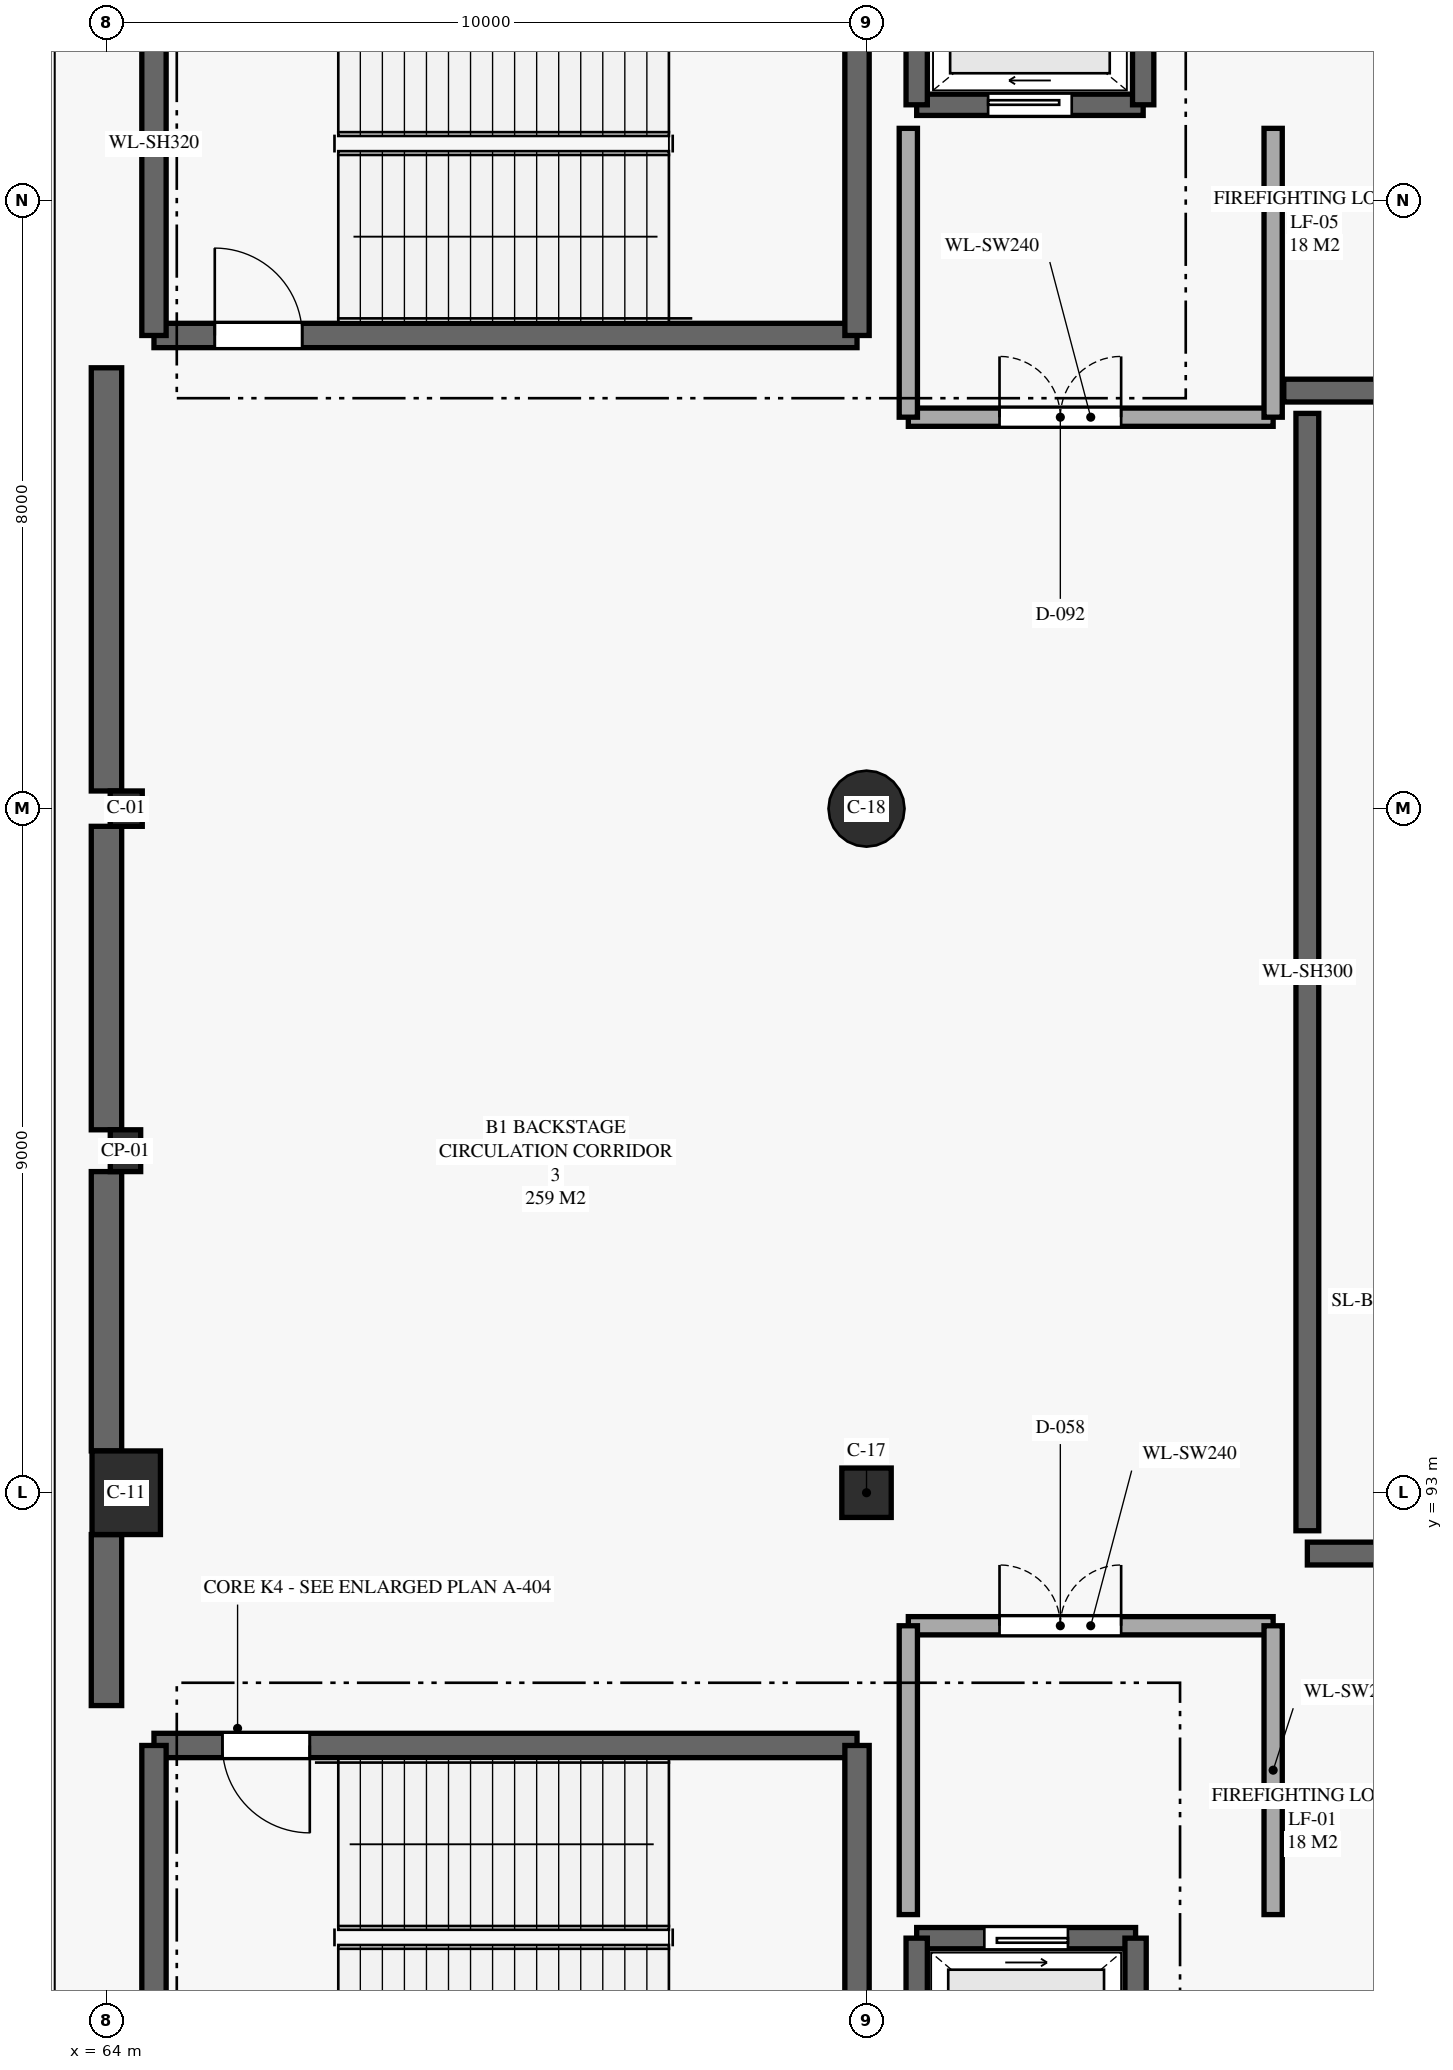
"""IFC4 building model, lengths in metres.
Left out: names, types, materials, properties, quantities, classifications, styles, units other than length and angle.
Written with IfcOpenShell. Run it as: python <this file> out.ifc"""

import sys

from ifc_helpers import new_model, si_unit, direction, frame, frame_2d, origin, origin_2d, place, context, subcontext, project, spatial, rectangle, circle, i_section, extrude, element, fill, save


model = new_model("IFC4")
c1 = context("Model", 3, precision=1e-05, world=origin(), true_north=direction((0.0, 1.0)))
c2 = subcontext(c1, "Body", "Model", "MODEL_VIEW")
j1 = project(units=[si_unit("LENGTHUNIT", "METRE"), si_unit("PLANEANGLEUNIT", "RADIAN")], contexts=[c1])
p1 = place(None, origin())
s1 = spatial("IfcSite", under=j1, at=p1, CompositionType="ELEMENT")
p2 = place(p1, origin())
s2 = spatial("IfcBuilding", under=s1, at=p2, CompositionType="ELEMENT")
p3 = place(p2, frame((0.0, 0.0, -5.4)))
s3 = spatial("IfcBuildingStorey", under=s2, at=p3, CompositionType="ELEMENT", Elevation=-5.4)
p4 = place(p3, frame((64.25, 97.5, -0.6), z_axis=(0.0, 0.0, 1.0), x_axis=(1.0, 0.0, 0.0)))
e1 = element("IfcColumn", 1, at=p4, inside=s3, PredefinedType="PILASTER", context=c2, shape_type="SweptSolid", body=[
    extrude(rectangle(XDim=0.4, YDim=0.55, at=origin_2d()), origin(), (0.0, 0.0, 1.0), 6.0),
])
p5 = place(p3, frame((64.26, 93.0, -0.6), z_axis=(0.0, 0.0, 1.0), x_axis=(1.0, 0.0, 0.0)))
e2 = element("IfcColumn", 2, at=p5, inside=s3, PredefinedType="COLUMN", context=c2, shape_type="SweptSolid", body=[
    extrude(rectangle(XDim=0.9, YDim=1.1, at=origin_2d()), origin(), (0.0, 0.0, 1.0), 6.0),
])
p6 = place(p3, frame((64.26, 102.0, -0.6), z_axis=(0.0, 0.0, 1.0), x_axis=(1.0, 0.0, 0.0)))
e3 = element("IfcColumn", 3, at=p6, inside=s3, PredefinedType="COLUMN", context=c2, shape_type="SweptSolid", body=[
    extrude(i_section(OverallWidth=0.422, OverallDepth=0.465, WebThickness=0.045, FlangeThickness=0.073, FilletRadius=0.02, at=origin_2d()), origin(), (0.0, 0.0, 1.0), 6.0),
])
p7 = place(p3, frame((74.0, 93.0, -0.6), z_axis=(0.0, 0.0, 1.0), x_axis=(1.0, 0.0, 0.0)))
e4 = element("IfcColumn", 4, at=p7, inside=s3, PredefinedType="COLUMN", context=c2, shape_type="SweptSolid", body=[
    extrude(rectangle(XDim=0.65, YDim=0.65, at=origin_2d()), origin(), (0.0, 0.0, 1.0), 6.0),
])
p8 = place(p3, frame((74.0, 102.0, -0.6), z_axis=(0.0, 0.0, 1.0), x_axis=(1.0, 0.0, 0.0)))
e5 = element("IfcColumn", 5, at=p8, inside=s3, PredefinedType="COLUMN", context=c2, shape_type="SweptSolid", body=[
    extrude(circle(Radius=0.5, at=origin_2d()), origin(), (0.0, 0.0, 1.0), 6.0),
])
p9 = place(p3, frame((64.625, 108.225, 0.0), z_axis=(0.0, 0.0, 1.0), x_axis=(1.0, 0.0, 0.0)))
e6 = element("IfcWall", 6, at=p9, inside=s3, PredefinedType="SHEAR", context=c2, shape_type="SweptSolid", body=[
    extrude(rectangle(XDim=9.25, YDim=0.32, at=frame_2d((4.625, 0.0))), origin(), (0.0, 0.0, 1.0), 5.0),
])
p10 = place(p9, frame((0.8, 0.0, 0.0)))
e7 = element("IfcOpeningElement", 7, at=p10, cuts=e6, PredefinedType="OPENING", context=c2, shape_type="SweptSolid", body=[
    extrude(rectangle(XDim=1.15, YDim=2.2, at=frame_2d((0.575, 1.1))), frame((0.0, 0.17, 0.0), z_axis=(0.0, -1.0, 0.0), x_axis=(1.0, 0.0, 0.0)), (0.0, 0.0, 1.0), 0.34),
])
for number, where, z_axis, x_axis in (
    (8, (64.625, 113.275, 0.0), (0.0, 0.0, 1.0), (0.0, -1.0, 0.0)),
    (9, (73.875, 108.225, 0.0), (0.0, 0.0, 1.0), (0.0, 1.0, 0.0)),
):
    element("IfcWall", number, at=place(p3, frame(where, z_axis=z_axis, x_axis=x_axis)), inside=s3, PredefinedType="SHEAR", context=c2, shape_type="SweptSolid", body=[
        extrude(rectangle(XDim=5.05, YDim=0.32, at=frame_2d((2.525, 0.0))), origin(), (0.0, 0.0, 1.0), 5.0),
    ])
p11 = place(p3, frame((73.875, 89.675, 0.0), z_axis=(0.0, 0.0, 1.0), x_axis=(-1.0, 0.0, 0.0)))
e10 = element("IfcWall", 10, at=p11, inside=s3, PredefinedType="SHEAR", context=c2, shape_type="SweptSolid", body=[
    extrude(rectangle(XDim=9.25, YDim=0.32, at=frame_2d((4.625, 0.0))), origin(), (0.0, 0.0, 1.0), 5.0),
])
p12 = place(p11, frame((7.2, 0.0, 0.0)))
e11 = element("IfcOpeningElement", 11, at=p12, cuts=e10, PredefinedType="OPENING", context=c2, shape_type="SweptSolid", body=[
    extrude(rectangle(XDim=1.15, YDim=2.2, at=frame_2d((0.575, 1.1))), frame((0.0, 0.17, 0.0), z_axis=(0.0, -1.0, 0.0), x_axis=(1.0, 0.0, 0.0)), (0.0, 0.0, 1.0), 0.34),
])
for number, where, z_axis, x_axis in (
    (12, (64.625, 89.675, 0.0), (0.0, 0.0, 1.0), (0.0, -1.0, 0.0)),
    (13, (73.875, 84.625, 0.0), (0.0, 0.0, 1.0), (0.0, 1.0, 0.0)),
):
    element("IfcWall", number, at=place(p3, frame(where, z_axis=z_axis, x_axis=x_axis)), inside=s3, PredefinedType="SHEAR", context=c2, shape_type="SweptSolid", body=[
        extrude(rectangle(XDim=5.05, YDim=0.32, at=frame_2d((2.525, 0.0))), origin(), (0.0, 0.0, 1.0), 5.0),
    ])
p13 = place(p3, frame((77.54, 87.14, 0.0), z_axis=(0.0, 0.0, 1.0), x_axis=(-1.0, 0.0, 0.0)))
e14 = element("IfcWall", 14, at=p13, inside=s3, PredefinedType="SHEAR", context=c2, shape_type="SweptSolid", body=[
    extrude(rectangle(XDim=2.88, YDim=0.28, at=frame_2d((1.44, 0.0))), origin(), (0.0, 0.0, 1.0), 5.0),
])
p14 = place(p13, frame((0.89, 0.0, 0.0)))
e15 = element("IfcOpeningElement", 15, at=p14, cuts=e14, PredefinedType="OPENING", context=c2, shape_type="SweptSolid", body=[
    extrude(rectangle(XDim=1.1, YDim=2.2, at=frame_2d((0.55, 1.1))), frame((0.0, 0.15, 0.0), z_axis=(0.0, -1.0, 0.0), x_axis=(1.0, 0.0, 0.0)), (0.0, 0.0, 1.0), 0.3),
])
for number, where, z_axis, x_axis in (
    (16, (74.66, 87.14, 0.0), (0.0, 0.0, 1.0), (0.0, -1.0, 0.0)),
    (17, (77.54, 84.66, 0.0), (0.0, 0.0, 1.0), (0.0, 1.0, 0.0)),
):
    element("IfcWall", number, at=place(p3, frame(where, z_axis=z_axis, x_axis=x_axis)), inside=s3, PredefinedType="SHEAR", context=c2, shape_type="SweptSolid", body=[
        extrude(rectangle(XDim=2.48, YDim=0.28, at=frame_2d((1.24, 0.0))), origin(), (0.0, 0.0, 1.0), 5.0),
    ])
p15 = place(p3, frame((74.55, 91.25, 0.0), z_axis=(0.0, 0.0, 1.0), x_axis=(1.0, 0.0, 0.0)))
e18 = element("IfcWall", 18, at=p15, inside=s3, PredefinedType="SOLIDWALL", context=c2, shape_type="SweptSolid", body=[
    extrude(rectangle(XDim=4.8, YDim=0.24, at=frame_2d((2.4, 0.0))), origin(), (0.0, 0.0, 1.0), 5.0),
])
p16 = place(p15, frame((1.2, 0.0, 0.0)))
e19 = element("IfcOpeningElement", 19, at=p16, cuts=e18, PredefinedType="OPENING", context=c2, shape_type="SweptSolid", body=[
    extrude(rectangle(XDim=1.6, YDim=2.2, at=frame_2d((0.8, 1.1))), frame((0.0, 0.13, 0.0), z_axis=(0.0, -1.0, 0.0), x_axis=(1.0, 0.0, 0.0)), (0.0, 0.0, 1.0), 0.26),
])
for number, where, z_axis, x_axis in (
    (20, (74.55, 91.25, 0.0), (0.0, 0.0, 1.0), (0.0, -1.0, 0.0)),
    (21, (79.35, 87.45, 0.0), (0.0, 0.0, 1.0), (0.0, 1.0, 0.0)),
):
    element("IfcWall", number, at=place(p3, frame(where, z_axis=z_axis, x_axis=x_axis)), inside=s3, PredefinedType="SOLIDWALL", context=c2, shape_type="SweptSolid", body=[
        extrude(rectangle(XDim=3.8, YDim=0.24, at=frame_2d((1.9, 0.0))), origin(), (0.0, 0.0, 1.0), 5.0),
    ])
p17 = place(p3, frame((74.66, 111.26, 0.0), z_axis=(0.0, 0.0, 1.0), x_axis=(1.0, 0.0, 0.0)))
e22 = element("IfcWall", 22, at=p17, inside=s3, PredefinedType="SHEAR", context=c2, shape_type="SweptSolid", body=[
    extrude(rectangle(XDim=2.98, YDim=0.28, at=frame_2d((1.49, 0.0))), origin(), (0.0, 0.0, 1.0), 5.0),
])
p18 = place(p17, frame((0.94, 0.0, 0.0)))
e23 = element("IfcOpeningElement", 23, at=p18, cuts=e22, PredefinedType="OPENING", context=c2, shape_type="SweptSolid", body=[
    extrude(rectangle(XDim=1.1, YDim=2.2, at=frame_2d((0.55, 1.1))), frame((0.0, 0.15, 0.0), z_axis=(0.0, -1.0, 0.0), x_axis=(1.0, 0.0, 0.0)), (0.0, 0.0, 1.0), 0.3),
])
for number, where, z_axis, x_axis in (
    (24, (74.66, 113.74, 0.0), (0.0, 0.0, 1.0), (0.0, -1.0, 0.0)),
    (25, (77.64, 111.26, 0.0), (0.0, 0.0, 1.0), (0.0, 1.0, 0.0)),
):
    element("IfcWall", number, at=place(p3, frame(where, z_axis=z_axis, x_axis=x_axis)), inside=s3, PredefinedType="SHEAR", context=c2, shape_type="SweptSolid", body=[
        extrude(rectangle(XDim=2.48, YDim=0.28, at=frame_2d((1.24, 0.0))), origin(), (0.0, 0.0, 1.0), 5.0),
    ])
p19 = place(p3, frame((74.55, 107.15, 0.0), z_axis=(0.0, 0.0, 1.0), x_axis=(1.0, 0.0, 0.0)))
e26 = element("IfcWall", 26, at=p19, inside=s3, PredefinedType="SOLIDWALL", context=c2, shape_type="SweptSolid", body=[
    extrude(rectangle(XDim=4.8, YDim=0.24, at=frame_2d((2.4, 0.0))), origin(), (0.0, 0.0, 1.0), 5.0),
])
p20 = place(p19, frame((1.2, 0.0, 0.0)))
e27 = element("IfcOpeningElement", 27, at=p20, cuts=e26, PredefinedType="OPENING", context=c2, shape_type="SweptSolid", body=[
    extrude(rectangle(XDim=1.6, YDim=2.2, at=frame_2d((0.8, 1.1))), frame((0.0, 0.13, 0.0), z_axis=(0.0, -1.0, 0.0), x_axis=(1.0, 0.0, 0.0)), (0.0, 0.0, 1.0), 0.26),
])
for number, where, z_axis, x_axis in (
    (28, (74.55, 110.95, 0.0), (0.0, 0.0, 1.0), (0.0, -1.0, 0.0)),
    (29, (79.35, 107.15, 0.0), (0.0, 0.0, 1.0), (0.0, 1.0, 0.0)),
):
    element("IfcWall", number, at=place(p3, frame(where, z_axis=z_axis, x_axis=x_axis)), inside=s3, PredefinedType="SOLIDWALL", context=c2, shape_type="SweptSolid", body=[
        extrude(rectangle(XDim=3.8, YDim=0.24, at=frame_2d((1.9, 0.0))), origin(), (0.0, 0.0, 1.0), 5.0),
    ])
p21 = place(p3, frame((64.0, 90.2, 0.0), z_axis=(0.0, 0.0, 1.0), x_axis=(0.0, 1.0, 0.0)))
e30 = element("IfcWall", 30, at=p21, inside=s3, PredefinedType="SHEAR", context=c2, shape_type="SweptSolid", body=[
    extrude(rectangle(XDim=2.25, YDim=0.4, at=frame_2d((1.125, 0.0))), origin(), (0.0, 0.0, 1.0), 5.0),
])
p22 = place(p3, frame((64.0, 93.55, 0.0), z_axis=(0.0, 0.0, 1.0), x_axis=(0.0, 1.0, 0.0)))
e31 = element("IfcWall", 31, at=p22, inside=s3, PredefinedType="SHEAR", context=c2, shape_type="SweptSolid", body=[
    extrude(rectangle(XDim=3.675, YDim=0.4, at=frame_2d((1.837, 0.0))), origin(), (0.0, 0.0, 1.0), 5.0),
])
p23 = place(p3, frame((64.0, 97.775, 0.0), z_axis=(0.0, 0.0, 1.0), x_axis=(0.0, 1.0, 0.0)))
e32 = element("IfcWall", 32, at=p23, inside=s3, PredefinedType="SHEAR", context=c2, shape_type="SweptSolid", body=[
    extrude(rectangle(XDim=3.993, YDim=0.4, at=frame_2d((1.996, 0.0))), origin(), (0.0, 0.0, 1.0), 5.0),
])
p24 = place(p3, frame((64.0, 102.232, 0.0), z_axis=(0.0, 0.0, 1.0), x_axis=(0.0, 1.0, 0.0)))
e33 = element("IfcWall", 33, at=p24, inside=s3, PredefinedType="SHEAR", context=c2, shape_type="SweptSolid", body=[
    extrude(rectangle(XDim=5.568, YDim=0.4, at=frame_2d((2.784, 0.0))), origin(), (0.0, 0.0, 1.0), 5.0),
])
p25 = place(p3, frame((79.8, 92.2, 0.0), z_axis=(0.0, 0.0, 1.0), x_axis=(1.0, 0.0, 0.0)))
e34 = element("IfcWall", 34, at=p25, inside=s3, PredefinedType="SHEAR", context=c2, shape_type="SweptSolid", body=[
    extrude(rectangle(XDim=23.7, YDim=0.3, at=frame_2d((11.85, 0.0))), origin(), (0.0, 0.0, 1.0), 5.0),
])
p26 = place(p25, frame((11.1, 0.0, 0.0)))
e35 = element("IfcOpeningElement", 35, at=p26, cuts=e34, PredefinedType="OPENING", context=c2, shape_type="SweptSolid", body=[
    extrude(rectangle(XDim=1.5, YDim=2.25, at=frame_2d((0.75, 1.125))), frame((0.0, 0.16, 0.0), z_axis=(0.0, -1.0, 0.0), x_axis=(1.0, 0.0, 0.0)), (0.0, 0.0, 1.0), 0.32),
])
p27 = place(p3, frame((103.5, 107.5, 0.0), z_axis=(0.0, 0.0, 1.0), x_axis=(-1.0, 0.0, 0.0)))
e36 = element("IfcWall", 36, at=p27, inside=s3, PredefinedType="SHEAR", context=c2, shape_type="SweptSolid", body=[
    extrude(rectangle(XDim=24.01, YDim=0.3, at=frame_2d((12.005, 0.0))), origin(), (0.0, 0.0, 1.0), 5.0),
])
p28 = place(p3, frame((79.8, 107.2, 0.0), z_axis=(0.0, 0.0, 1.0), x_axis=(0.0, -1.0, 0.0)))
e37 = element("IfcWall", 37, at=p28, inside=s3, PredefinedType="SHEAR", context=c2, shape_type="SweptSolid", body=[
    extrude(rectangle(XDim=14.7, YDim=0.3, at=frame_2d((7.35, 0.0))), origin(), (0.0, 0.0, 1.0), 5.0),
])
p29 = place(p10, origin())
e38 = element("IfcDoor", 38, at=p29, inside=s3, OperationType="SINGLE_SWING_LEFT", PredefinedType="DOOR", context=c2, shape_type="SweptSolid", body=[
    extrude(rectangle(XDim=1.15, YDim=2.2, at=frame_2d((0.575, 1.1))), frame((0.0, 0.025, 0.0), z_axis=(0.0, -1.0, 0.0), x_axis=(1.0, 0.0, 0.0)), (0.0, 0.0, 1.0), 0.05),
])
fill(e7, e38)
p30 = place(p12, origin())
e39 = element("IfcDoor", 39, at=p30, inside=s3, OperationType="SINGLE_SWING_LEFT", PredefinedType="DOOR", context=c2, shape_type="SweptSolid", body=[
    extrude(rectangle(XDim=1.15, YDim=2.2, at=frame_2d((0.575, 1.1))), frame((0.0, 0.025, 0.0), z_axis=(0.0, -1.0, 0.0), x_axis=(1.0, 0.0, 0.0)), (0.0, 0.0, 1.0), 0.05),
])
fill(e11, e39)
p31 = place(p14, origin())
e40 = element("IfcDoor", 40, at=p31, inside=s3, OperationType="SLIDING_TO_LEFT", PredefinedType="DOOR", context=c2, shape_type="SweptSolid", body=[
    extrude(rectangle(XDim=1.1, YDim=2.2, at=frame_2d((0.55, 1.1))), frame((0.0, 0.025, 0.0), z_axis=(0.0, -1.0, 0.0), x_axis=(1.0, 0.0, 0.0)), (0.0, 0.0, 1.0), 0.05),
])
fill(e15, e40)
p32 = place(p16, origin())
e41 = element("IfcDoor", 41, at=p32, inside=s3, OperationType="DOUBLE_DOOR_SINGLE_SWING", PredefinedType="DOOR", context=c2, shape_type="SweptSolid", body=[
    extrude(rectangle(XDim=1.6, YDim=2.2, at=frame_2d((0.8, 1.1))), frame((0.0, 0.025, 0.0), z_axis=(0.0, -1.0, 0.0), x_axis=(1.0, 0.0, 0.0)), (0.0, 0.0, 1.0), 0.05),
])
fill(e19, e41)
p33 = place(p18, origin())
e42 = element("IfcDoor", 42, at=p33, inside=s3, OperationType="SLIDING_TO_LEFT", PredefinedType="DOOR", context=c2, shape_type="SweptSolid", body=[
    extrude(rectangle(XDim=1.1, YDim=2.2, at=frame_2d((0.55, 1.1))), frame((0.0, 0.025, 0.0), z_axis=(0.0, -1.0, 0.0), x_axis=(1.0, 0.0, 0.0)), (0.0, 0.0, 1.0), 0.05),
])
fill(e23, e42)
p34 = place(p20, origin())
e43 = element("IfcDoor", 43, at=p34, inside=s3, OperationType="DOUBLE_DOOR_SINGLE_SWING", PredefinedType="DOOR", context=c2, shape_type="SweptSolid", body=[
    extrude(rectangle(XDim=1.6, YDim=2.2, at=frame_2d((0.8, 1.1))), frame((0.0, 0.025, 0.0), z_axis=(0.0, -1.0, 0.0), x_axis=(1.0, 0.0, 0.0)), (0.0, 0.0, 1.0), 0.05),
])
fill(e27, e43)
save(model, sys.argv[1])
